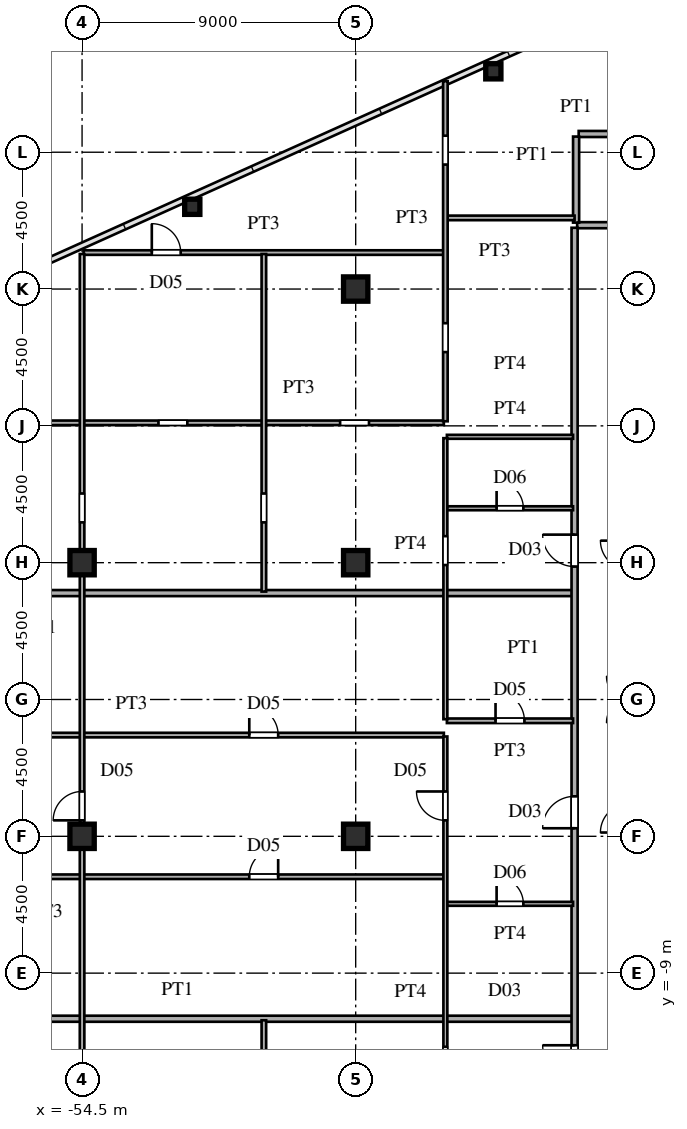
"""IFC4 building model, lengths in metres.
Left out: names, types, materials, properties, quantities, classifications, styles, units other than length and angle.
Written with IfcOpenShell. Run it as: python <this file> out.ifc"""

import sys

from ifc_helpers import new_model, si_unit, direction, frame, frame_2d, origin, origin_2d, place, context, subcontext, project, spatial, rectangle, hollow_rectangle, i_section, extrude, source, transform, mapped, element, fill, save


model = new_model("IFC4")
c1 = context("Model", 3, precision=1e-05, world=origin(), true_north=direction((0.0, 1.0)))
c2 = subcontext(c1, "Body", "Model", "MODEL_VIEW")
j1 = project(units=[si_unit("LENGTHUNIT", "METRE"), si_unit("PLANEANGLEUNIT", "RADIAN")], contexts=[c1])
p1 = place(None, origin())
s1 = spatial("IfcSite", under=j1, at=p1, CompositionType="ELEMENT")
p2 = place(p1, origin())
s2 = spatial("IfcBuilding", under=s1, at=p2, CompositionType="ELEMENT")
p3 = place(p2, frame((0.0, 0.0, 106.8)))
s3 = spatial("IfcBuildingStorey", under=s2, at=p3, CompositionType="ELEMENT", Elevation=106.8)
m1 = source(origin(), c2, "Body", "SweptSolid", [
    extrude(i_section(OverallWidth=0.8, OverallDepth=0.8, WebThickness=0.032, FlangeThickness=0.05, at=origin_2d()), origin(), (0.0, 0.0, 1.0), 3.6),
])
for number, where, z_axis, x_axis in (
    (1, (-45.5, -4.5, 0.0), (0.0, 0.0, 1.0), (1.0, 0.0, 0.0)),
    (2, (-45.5, 4.5, 0.0), (0.0, 0.0, 1.0), (1.0, 0.0, 0.0)),
    (3, (-45.5, 13.5, 0.0), (0.0, 0.0, 1.0), (1.0, 0.0, 0.0)),
    (4, (-54.5, -4.5, 0.0), (0.0, 0.0, 1.0), (1.0, 0.0, 0.0)),
    (5, (-54.5, 4.5, 0.0), (0.0, 0.0, 1.0), (1.0, 0.0, 0.0)),
):
    element("IfcColumn", number, at=place(p3, frame(where, z_axis=z_axis, x_axis=x_axis)), inside=s3, PredefinedType="COLUMN", context=c2, shape_type="MappedRepresentation", body=[
        mapped(m1, transform((0.0, 0.0, 0.0), scale=1.0)),
    ])
m2 = source(origin(), c2, "Body", "SweptSolid", [
    extrude(hollow_rectangle(XDim=0.5, YDim=0.5, WallThickness=0.02, at=origin_2d()), origin(), (0.0, 0.0, 1.0), 3.6),
])
for number, where, z_axis, x_axis in (
    (6, (-40.973, 20.661, 0.0), (0.0, 0.0, 1.0), (1.0, 0.0, 0.0)),
    (7, (-50.875, 16.205, 0.0), (0.0, 0.0, 1.0), (1.0, 0.0, 0.0)),
):
    element("IfcColumn", number, at=place(p3, frame(where, z_axis=z_axis, x_axis=x_axis)), inside=s3, PredefinedType="COLUMN", context=c2, shape_type="MappedRepresentation", body=[
        mapped(m2, transform((0.0, 0.0, 0.0), scale=1.0)),
    ])
p4 = place(p3, frame((-64.346, -10.5, 0.0), z_axis=(0.0, 0.0, 1.0), x_axis=(1.0, 0.0, 0.0)))
e8 = element("IfcWall", 8, at=p4, inside=s3, PredefinedType="PARTITIONING", context=c2, shape_type="SweptSolid", body=[
    extrude(rectangle(XDim=25.966, YDim=0.2, at=frame_2d((12.983, 0.0))), origin(), (0.0, 0.0, 1.0), 3.38),
])
p5 = place(p3, frame((-42.5, -6.72, 0.0), z_axis=(0.0, 0.0, 1.0), x_axis=(1.0, 0.0, 0.0)))
e9 = element("IfcWall", 9, at=p5, inside=s3, PredefinedType="PARTITIONING", context=c2, shape_type="SweptSolid", body=[
    extrude(rectangle(XDim=4.15, YDim=0.13, at=frame_2d((2.075, 0.0))), origin(), (0.0, 0.0, 1.0), 3.38),
])
p6 = place(p5, frame((1.635, 0.0, 0.0)))
e10 = element("IfcOpeningElement", 10, at=p6, cuts=e9, PredefinedType="OPENING", context=c2, shape_type="SweptSolid", body=[
    extrude(rectangle(XDim=0.88, YDim=2.1, at=frame_2d((0.44, 1.05))), frame((0.0, 0.075, 0.0), z_axis=(0.0, -1.0, 0.0), x_axis=(1.0, 0.0, 0.0)), (0.0, 0.0, 1.0), 0.15),
])
p7 = place(p3, frame((-71.035, -5.83, 0.0), z_axis=(0.0, 0.0, 1.0), x_axis=(1.0, 0.0, 0.0)))
e11 = element("IfcWall", 11, at=p7, inside=s3, PredefinedType="PARTITIONING", context=c2, shape_type="SweptSolid", body=[
    extrude(rectangle(XDim=28.435, YDim=0.15, at=frame_2d((14.217, 0.0))), origin(), (0.0, 0.0, 1.0), 3.38),
])
p8 = place(p7, frame((22.035, 0.0, 0.0)))
e12 = element("IfcOpeningElement", 12, at=p8, cuts=e11, PredefinedType="OPENING", context=c2, shape_type="SweptSolid", body=[
    extrude(rectangle(XDim=0.95, YDim=2.15, at=frame_2d((0.475, 1.075))), frame((0.0, 0.085, 0.0), z_axis=(0.0, -1.0, 0.0), x_axis=(1.0, 0.0, 0.0)), (0.0, 0.0, 1.0), 0.17),
])
p9 = place(p7, frame((13.21, 0.0, 0.0)))
e13 = element("IfcOpeningElement", 13, at=p9, cuts=e11, PredefinedType="OPENING", context=c2, shape_type="SweptSolid", body=[
    extrude(rectangle(XDim=0.95, YDim=2.15, at=frame_2d((0.475, 1.075))), frame((0.0, 0.085, 0.0), z_axis=(0.0, -1.0, 0.0), x_axis=(1.0, 0.0, 0.0)), (0.0, 0.0, 1.0), 0.17),
])
p10 = place(p3, frame((-71.035, -1.17, 0.0), z_axis=(0.0, 0.0, 1.0), x_axis=(1.0, 0.0, 0.0)))
e14 = element("IfcWall", 14, at=p10, inside=s3, PredefinedType="PARTITIONING", context=c2, shape_type="SweptSolid", body=[
    extrude(rectangle(XDim=28.435, YDim=0.15, at=frame_2d((14.217, 0.0))), origin(), (0.0, 0.0, 1.0), 3.38),
])
p11 = place(p10, frame((22.035, 0.0, 0.0)))
e15 = element("IfcOpeningElement", 15, at=p11, cuts=e14, PredefinedType="OPENING", context=c2, shape_type="SweptSolid", body=[
    extrude(rectangle(XDim=0.95, YDim=2.15, at=frame_2d((0.475, 1.075))), frame((0.0, 0.085, 0.0), z_axis=(0.0, -1.0, 0.0), x_axis=(1.0, 0.0, 0.0)), (0.0, 0.0, 1.0), 0.17),
])
p12 = place(p10, frame((13.21, 0.0, 0.0)))
e16 = element("IfcOpeningElement", 16, at=p12, cuts=e14, PredefinedType="OPENING", context=c2, shape_type="SweptSolid", body=[
    extrude(rectangle(XDim=0.95, YDim=2.15, at=frame_2d((0.475, 1.075))), frame((0.0, 0.085, 0.0), z_axis=(0.0, -1.0, 0.0), x_axis=(1.0, 0.0, 0.0)), (0.0, 0.0, 1.0), 0.17),
])
p13 = place(p3, frame((-42.5, -0.7, 0.0), z_axis=(0.0, 0.0, 1.0), x_axis=(1.0, 0.0, 0.0)))
e17 = element("IfcWall", 17, at=p13, inside=s3, PredefinedType="PARTITIONING", context=c2, shape_type="SweptSolid", body=[
    extrude(rectangle(XDim=4.15, YDim=0.15, at=frame_2d((2.075, 0.0))), origin(), (0.0, 0.0, 1.0), 3.38),
])
p14 = place(p13, frame((1.6, 0.0, 0.0)))
e18 = element("IfcOpeningElement", 18, at=p14, cuts=e17, PredefinedType="OPENING", context=c2, shape_type="SweptSolid", body=[
    extrude(rectangle(XDim=0.95, YDim=2.15, at=frame_2d((0.475, 1.075))), frame((0.0, 0.085, 0.0), z_axis=(0.0, -1.0, 0.0), x_axis=(1.0, 0.0, 0.0)), (0.0, 0.0, 1.0), 0.17),
])
p15 = place(p3, frame((-71.005, 3.5, 0.0), z_axis=(0.0, 0.0, 1.0), x_axis=(1.0, 0.0, 0.0)))
e19 = element("IfcWall", 19, at=p15, inside=s3, PredefinedType="PARTITIONING", context=c2, shape_type="SweptSolid", body=[
    extrude(rectangle(XDim=32.625, YDim=0.2, at=frame_2d((16.312, 0.0))), origin(), (0.0, 0.0, 1.0), 3.38),
])
p16 = place(p3, frame((-42.5, 6.29, 0.0), z_axis=(0.0, 0.0, 1.0), x_axis=(1.0, 0.0, 0.0)))
e20 = element("IfcWall", 20, at=p16, inside=s3, PredefinedType="PARTITIONING", context=c2, shape_type="SweptSolid", body=[
    extrude(rectangle(XDim=4.15, YDim=0.13, at=frame_2d((2.075, 0.0))), origin(), (0.0, 0.0, 1.0), 3.38),
])
p17 = place(p16, frame((1.635, 0.0, 0.0)))
e21 = element("IfcOpeningElement", 21, at=p17, cuts=e20, PredefinedType="OPENING", context=c2, shape_type="SweptSolid", body=[
    extrude(rectangle(XDim=0.88, YDim=2.1, at=frame_2d((0.44, 1.05))), frame((0.0, 0.075, 0.0), z_axis=(0.0, -1.0, 0.0), x_axis=(1.0, 0.0, 0.0)), (0.0, 0.0, 1.0), 0.15),
])
p18 = place(p3, frame((-42.5, 8.64, 0.0), z_axis=(0.0, 0.0, 1.0), x_axis=(1.0, 0.0, 0.0)))
e22 = element("IfcWall", 22, at=p18, inside=s3, PredefinedType="PARTITIONING", context=c2, shape_type="SweptSolid", body=[
    extrude(rectangle(XDim=4.15, YDim=0.13, at=frame_2d((2.075, 0.0))), origin(), (0.0, 0.0, 1.0), 3.38),
])
p19 = place(p3, frame((-67.478, 9.1, 0.0), z_axis=(0.0, 0.0, 1.0), x_axis=(1.0, 0.0, 0.0)))
e23 = element("IfcWall", 23, at=p19, inside=s3, PredefinedType="PARTITIONING", context=c2, shape_type="SweptSolid", body=[
    extrude(rectangle(XDim=24.878, YDim=0.15, at=frame_2d((12.439, 0.0))), origin(), (0.0, 0.0, 1.0), 3.38),
])
p20 = place(p19, frame((21.466, 0.0, 0.0)))
e24 = element("IfcOpeningElement", 24, at=p20, cuts=e23, PredefinedType="OPENING", context=c2, shape_type="SweptSolid", body=[
    extrude(rectangle(XDim=0.95, YDim=2.15, at=frame_2d((0.475, 1.075))), frame((0.0, 0.085, 0.0), z_axis=(0.0, -1.0, 0.0), x_axis=(1.0, 0.0, 0.0)), (0.0, 0.0, 1.0), 0.17),
])
p21 = place(p19, frame((9.653, 0.0, 0.0)))
e25 = element("IfcOpeningElement", 25, at=p21, cuts=e23, PredefinedType="OPENING", context=c2, shape_type="SweptSolid", body=[
    extrude(rectangle(XDim=0.95, YDim=2.15, at=frame_2d((0.475, 1.075))), frame((0.0, 0.085, 0.0), z_axis=(0.0, -1.0, 0.0), x_axis=(1.0, 0.0, 0.0)), (0.0, 0.0, 1.0), 0.17),
])
p22 = place(p19, frame((15.49, 0.0, 0.0)))
e26 = element("IfcOpeningElement", 26, at=p22, cuts=e23, PredefinedType="OPENING", context=c2, shape_type="SweptSolid", body=[
    extrude(rectangle(XDim=0.95, YDim=2.15, at=frame_2d((0.475, 1.075))), frame((0.0, 0.085, 0.0), z_axis=(0.0, -1.0, 0.0), x_axis=(1.0, 0.0, 0.0)), (0.0, 0.0, 1.0), 0.17),
])
p23 = place(p3, frame((-54.45, 14.7, 0.0), z_axis=(0.0, 0.0, 1.0), x_axis=(1.0, 0.0, 0.0)))
e27 = element("IfcWall", 27, at=p23, inside=s3, PredefinedType="PARTITIONING", context=c2, shape_type="SweptSolid", body=[
    extrude(rectangle(XDim=11.85, YDim=0.15, at=frame_2d((5.925, 0.0))), origin(), (0.0, 0.0, 1.0), 3.38),
])
p24 = place(p23, frame((2.244, 0.0, 0.0)))
e28 = element("IfcOpeningElement", 28, at=p24, cuts=e27, PredefinedType="OPENING", context=c2, shape_type="SweptSolid", body=[
    extrude(rectangle(XDim=0.95, YDim=2.15, at=frame_2d((0.475, 1.075))), frame((0.0, 0.085, 0.0), z_axis=(0.0, -1.0, 0.0), x_axis=(1.0, 0.0, 0.0)), (0.0, 0.0, 1.0), 0.17),
])
p25 = place(p3, frame((-38.215, 15.6, 0.0), z_axis=(0.0, 0.0, 1.0), x_axis=(1.0, 0.0, 0.0)))
e29 = element("IfcWall", 29, at=p25, inside=s3, PredefinedType="PARTITIONING", context=c2, shape_type="SweptSolid", body=[
    extrude(rectangle(XDim=1.63, YDim=0.2, at=frame_2d((0.815, 0.0))), origin(), (0.0, 0.0, 1.0), 3.38),
])
p26 = place(p3, frame((-42.5, 15.84, 0.0), z_axis=(0.0, 0.0, 1.0), x_axis=(1.0, 0.0, 0.0)))
e30 = element("IfcWall", 30, at=p26, inside=s3, PredefinedType="PARTITIONING", context=c2, shape_type="SweptSolid", body=[
    extrude(rectangle(XDim=4.2, YDim=0.15, at=frame_2d((2.1, 0.0))), origin(), (0.0, 0.0, 1.0), 3.38),
])
p27 = place(p3, frame((-38.165, 18.6, 0.0), z_axis=(0.0, 0.0, 1.0), x_axis=(1.0, 0.0, 0.0)))
e31 = element("IfcWall", 31, at=p27, inside=s3, PredefinedType="PARTITIONING", context=c2, shape_type="SweptSolid", body=[
    extrude(rectangle(XDim=0.753, YDim=0.2, at=frame_2d((0.376, 0.0))), origin(), (0.0, 0.0, 1.0), 2.08),
])
p28 = place(p3, frame((-37.412, 18.6, 0.0), z_axis=(0.0, 0.0, 1.0), x_axis=(1.0, 0.0, 0.0)))
e32 = element("IfcWall", 32, at=p28, inside=s3, PredefinedType="PARTITIONING", context=c2, shape_type="SweptSolid", body=[
    extrude(rectangle(XDim=1.577, YDim=0.2, at=frame_2d((0.789, 0.0))), origin(), (0.0, 0.0, 1.0), 3.38),
])
p29 = place(p3, frame((-54.5, -14.96, 0.0), z_axis=(0.0, 0.0, 1.0), x_axis=(0.0, 1.0, 0.0)))
e33 = element("IfcWall", 33, at=p29, inside=s3, PredefinedType="PARTITIONING", context=c2, shape_type="SweptSolid", body=[
    extrude(rectangle(XDim=29.612, YDim=0.15, at=frame_2d((14.806, 0.0))), origin(), (0.0, 0.0, 1.0), 2.78),
])
p30 = place(p29, frame((1.772, 0.0, 0.0)))
e34 = element("IfcOpeningElement", 34, at=p30, cuts=e33, PredefinedType="OPENING", context=c2, shape_type="SweptSolid", body=[
    extrude(rectangle(XDim=0.95, YDim=2.15, at=frame_2d((0.475, 1.075))), frame((0.0, 0.085, 0.0), z_axis=(0.0, -1.0, 0.0), x_axis=(1.0, 0.0, 0.0)), (0.0, 0.0, 1.0), 0.17),
])
p31 = place(p29, frame((10.985, 0.0, 0.0)))
e35 = element("IfcOpeningElement", 35, at=p31, cuts=e33, PredefinedType="OPENING", context=c2, shape_type="SweptSolid", body=[
    extrude(rectangle(XDim=0.95, YDim=2.15, at=frame_2d((0.475, 1.075))), frame((0.0, 0.085, 0.0), z_axis=(0.0, -1.0, 0.0), x_axis=(1.0, 0.0, 0.0)), (0.0, 0.0, 1.0), 0.17),
])
p32 = place(p29, frame((20.785, 0.0, 0.0)))
e36 = element("IfcOpeningElement", 36, at=p32, cuts=e33, PredefinedType="OPENING", context=c2, shape_type="SweptSolid", body=[
    extrude(rectangle(XDim=0.95, YDim=2.15, at=frame_2d((0.475, 1.075))), frame((0.0, 0.085, 0.0), z_axis=(0.0, -1.0, 0.0), x_axis=(1.0, 0.0, 0.0)), (0.0, 0.0, 1.0), 0.17),
])
p33 = place(p3, frame((-48.52, -15.351, 0.0), z_axis=(0.0, 0.0, 1.0), x_axis=(0.0, 1.0, 0.0)))
e37 = element("IfcWall", 37, at=p33, inside=s3, PredefinedType="PARTITIONING", context=c2, shape_type="SweptSolid", body=[
    extrude(rectangle(XDim=4.801, YDim=0.15, at=frame_2d((2.4, 0.0))), origin(), (0.0, 0.0, 1.0), 3.38),
])
p34 = place(p33, frame((1.925, 0.0, 0.0)))
e38 = element("IfcOpeningElement", 38, at=p34, cuts=e37, PredefinedType="OPENING", context=c2, shape_type="SweptSolid", body=[
    extrude(rectangle(XDim=0.95, YDim=2.15, at=frame_2d((0.475, 1.075))), frame((0.0, 0.085, 0.0), z_axis=(0.0, -1.0, 0.0), x_axis=(1.0, 0.0, 0.0)), (0.0, 0.0, 1.0), 0.17),
])
p35 = place(p3, frame((-48.52, 3.55, 0.0), z_axis=(0.0, 0.0, 1.0), x_axis=(0.0, 1.0, 0.0)))
e39 = element("IfcWall", 39, at=p35, inside=s3, PredefinedType="PARTITIONING", context=c2, shape_type="SweptSolid", body=[
    extrude(rectangle(XDim=11.102, YDim=0.15, at=frame_2d((5.551, 0.0))), origin(), (0.0, 0.0, 1.0), 3.38),
])
p36 = place(p35, frame((2.275, 0.0, 0.0)))
e40 = element("IfcOpeningElement", 40, at=p36, cuts=e39, PredefinedType="OPENING", context=c2, shape_type="SweptSolid", body=[
    extrude(rectangle(XDim=0.95, YDim=2.15, at=frame_2d((0.475, 1.075))), frame((0.0, 0.085, 0.0), z_axis=(0.0, -1.0, 0.0), x_axis=(1.0, 0.0, 0.0)), (0.0, 0.0, 1.0), 0.17),
])
p37 = place(p3, frame((-42.55, -20.337, 0.0), z_axis=(0.0, 0.0, 1.0), x_axis=(0.0, 1.0, 0.0)))
e41 = element("IfcWall", 41, at=p37, inside=s3, PredefinedType="PARTITIONING", context=c2, shape_type="SweptSolid", body=[
    extrude(rectangle(XDim=19.12, YDim=0.13, at=frame_2d((9.56, 0.0))), origin(), (0.0, 0.0, 1.0), 3.38),
])
p38 = place(p37, frame((7.965, 0.0, 0.0)))
e42 = element("IfcOpeningElement", 42, at=p38, cuts=e41, PredefinedType="OPENING", context=c2, shape_type="SweptSolid", body=[
    extrude(rectangle(XDim=0.95, YDim=2.15, at=frame_2d((0.475, 1.075))), frame((0.0, 0.075, 0.0), z_axis=(0.0, -1.0, 0.0), x_axis=(1.0, 0.0, 0.0)), (0.0, 0.0, 1.0), 0.15),
])
p39 = place(p37, frame((1.161, 0.0, 0.0)))
e43 = element("IfcOpeningElement", 43, at=p39, cuts=e41, PredefinedType="OPENING", context=c2, shape_type="SweptSolid", body=[
    extrude(rectangle(XDim=0.95, YDim=2.15, at=frame_2d((0.475, 1.075))), frame((0.0, 0.075, 0.0), z_axis=(0.0, -1.0, 0.0), x_axis=(1.0, 0.0, 0.0)), (0.0, 0.0, 1.0), 0.15),
])
p40 = place(p37, frame((16.362, 0.0, 0.0)))
e44 = element("IfcOpeningElement", 44, at=p40, cuts=e41, PredefinedType="OPENING", context=c2, shape_type="SweptSolid", body=[
    extrude(rectangle(XDim=0.95, YDim=2.15, at=frame_2d((0.475, 1.075))), frame((0.0, 0.075, 0.0), z_axis=(0.0, -1.0, 0.0), x_axis=(1.0, 0.0, 0.0)), (0.0, 0.0, 1.0), 0.15),
])
p41 = place(p3, frame((-42.55, -0.648, 0.0), z_axis=(0.0, 0.0, 1.0), x_axis=(0.0, 1.0, 0.0)))
e45 = element("IfcWall", 45, at=p41, inside=s3, PredefinedType="PARTITIONING", context=c2, shape_type="SweptSolid", body=[
    extrude(rectangle(XDim=9.243, YDim=0.13, at=frame_2d((4.622, 0.0))), origin(), (0.0, 0.0, 1.0), 3.38),
])
p42 = place(p41, frame((5.071, 0.0, 0.0)))
e46 = element("IfcOpeningElement", 46, at=p42, cuts=e45, PredefinedType="OPENING", context=c2, shape_type="SweptSolid", body=[
    extrude(rectangle(XDim=0.95, YDim=2.15, at=frame_2d((0.475, 1.075))), frame((0.0, 0.075, 0.0), z_axis=(0.0, -1.0, 0.0), x_axis=(1.0, 0.0, 0.0)), (0.0, 0.0, 1.0), 0.15),
])
p43 = place(p3, frame((-42.55, 9.151, 0.0), z_axis=(0.0, 0.0, 1.0), x_axis=(0.0, 1.0, 0.0)))
e47 = element("IfcWall", 47, at=p43, inside=s3, PredefinedType="PARTITIONING", context=c2, shape_type="SweptSolid", body=[
    extrude(rectangle(XDim=11.186, YDim=0.15, at=frame_2d((5.593, 0.0))), origin(), (0.0, 0.0, 1.0), 3.38),
])
p44 = place(p43, frame((2.275, 0.0, 0.0)))
e48 = element("IfcOpeningElement", 48, at=p44, cuts=e47, PredefinedType="OPENING", context=c2, shape_type="SweptSolid", body=[
    extrude(rectangle(XDim=0.95, YDim=2.15, at=frame_2d((0.475, 1.075))), frame((0.0, 0.085, 0.0), z_axis=(0.0, -1.0, 0.0), x_axis=(1.0, 0.0, 0.0)), (0.0, 0.0, 1.0), 0.17),
])
p45 = place(p43, frame((8.443, 0.0, 0.0)))
e49 = element("IfcOpeningElement", 49, at=p45, cuts=e47, PredefinedType="OPENING", context=c2, shape_type="SweptSolid", body=[
    extrude(rectangle(XDim=0.95, YDim=2.15, at=frame_2d((0.475, 1.075))), frame((0.0, 0.085, 0.0), z_axis=(0.0, -1.0, 0.0), x_axis=(1.0, 0.0, 0.0)), (0.0, 0.0, 1.0), 0.17),
])
p46 = place(p3, frame((-38.3, -15.515, 0.0), z_axis=(0.0, 0.0, 1.0), x_axis=(0.0, 1.0, 0.0)))
e50 = element("IfcWall", 50, at=p46, inside=s3, PredefinedType="PARTITIONING", context=c2, shape_type="SweptSolid", body=[
    extrude(rectangle(XDim=31.03, YDim=0.2, at=frame_2d((15.515, 0.0))), origin(), (0.0, 0.0, 1.0), 3.38),
])
p47 = place(p46, frame((3.093, 0.0, 0.0)))
e51 = element("IfcOpeningElement", 51, at=p47, cuts=e50, PredefinedType="OPENING", context=c2, shape_type="SweptSolid", body=[
    extrude(rectangle(XDim=1.05, YDim=2.25, at=frame_2d((0.525, 1.125))), frame((0.0, 0.11, 0.0), z_axis=(0.0, -1.0, 0.0), x_axis=(1.0, 0.0, 0.0)), (0.0, 0.0, 1.0), 0.22),
])
p48 = place(p46, frame((11.28, 0.0, 0.0)))
e52 = element("IfcOpeningElement", 52, at=p48, cuts=e50, PredefinedType="OPENING", context=c2, shape_type="SweptSolid", body=[
    extrude(rectangle(XDim=1.05, YDim=2.25, at=frame_2d((0.525, 1.125))), frame((0.0, 0.11, 0.0), z_axis=(0.0, -1.0, 0.0), x_axis=(1.0, 0.0, 0.0)), (0.0, 0.0, 1.0), 0.22),
])
p49 = place(p46, frame((19.887, 0.0, 0.0)))
e53 = element("IfcOpeningElement", 53, at=p49, cuts=e50, PredefinedType="OPENING", context=c2, shape_type="SweptSolid", body=[
    extrude(rectangle(XDim=1.05, YDim=2.25, at=frame_2d((0.525, 1.125))), frame((0.0, 0.11, 0.0), z_axis=(0.0, -1.0, 0.0), x_axis=(1.0, 0.0, 0.0)), (0.0, 0.0, 1.0), 0.22),
])
p50 = place(p3, frame((-38.25, 15.685, 0.0), z_axis=(0.0, 0.0, 1.0), x_axis=(0.0, 1.0, 0.0)))
e54 = element("IfcWall", 54, at=p50, inside=s3, PredefinedType="PARTITIONING", context=c2, shape_type="SweptSolid", body=[
    extrude(rectangle(XDim=2.83, YDim=0.2, at=frame_2d((1.415, 0.0))), origin(), (0.0, 0.0, 1.0), 3.38),
])
m3 = source(origin(), c2, "Body", "SweptSolid", [
    extrude(rectangle(XDim=0.88, YDim=2.1, at=frame_2d((0.44, 1.05))), frame((0.0, 0.025, 0.0), z_axis=(0.0, -1.0, 0.0), x_axis=(1.0, 0.0, 0.0)), (0.0, 0.0, 1.0), 0.05),
])
p51 = place(p6, origin())
e55 = element("IfcDoor", 55, at=p51, inside=s3, OperationType="SINGLE_SWING_LEFT", PredefinedType="DOOR", context=c2, shape_type="MappedRepresentation", body=[
    mapped(m3, transform((0.0, 0.0, 0.0), scale=1.0)),
])
fill(e10, e55)
m4 = source(origin(), c2, "Body", "SweptSolid", [
    extrude(rectangle(XDim=0.95, YDim=2.15, at=frame_2d((0.475, 1.075))), frame((0.0, 0.025, 0.0), z_axis=(0.0, -1.0, 0.0), x_axis=(1.0, 0.0, 0.0)), (0.0, 0.0, 1.0), 0.05),
])
p52 = place(p8, origin())
e56 = element("IfcDoor", 56, at=p52, inside=s3, OperationType="SINGLE_SWING_RIGHT", PredefinedType="DOOR", context=c2, shape_type="MappedRepresentation", body=[
    mapped(m4, transform((0.0, 0.0, 0.0), scale=1.0)),
])
fill(e12, e56)
p53 = place(p11, origin())
e57 = element("IfcDoor", 57, at=p53, inside=s3, OperationType="SINGLE_SWING_LEFT", PredefinedType="DOOR", context=c2, shape_type="MappedRepresentation", body=[
    mapped(m4, transform((0.0, 0.0, 0.0), scale=1.0)),
])
fill(e15, e57)
p54 = place(p14, origin())
e58 = element("IfcDoor", 58, at=p54, inside=s3, OperationType="SINGLE_SWING_LEFT", PredefinedType="DOOR", context=c2, shape_type="MappedRepresentation", body=[
    mapped(m4, transform((0.0, 0.0, 0.0), scale=1.0)),
])
fill(e18, e58)
p55 = place(p17, origin())
e59 = element("IfcDoor", 59, at=p55, inside=s3, OperationType="SINGLE_SWING_LEFT", PredefinedType="DOOR", context=c2, shape_type="MappedRepresentation", body=[
    mapped(m3, transform((0.0, 0.0, 0.0), scale=1.0)),
])
fill(e21, e59)
p56 = place(p24, origin())
e60 = element("IfcDoor", 60, at=p56, inside=s3, OperationType="SINGLE_SWING_LEFT", PredefinedType="DOOR", context=c2, shape_type="MappedRepresentation", body=[
    mapped(m4, transform((0.0, 0.0, 0.0), scale=1.0)),
])
fill(e28, e60)
p57 = place(p31, origin())
e61 = element("IfcDoor", 61, at=p57, inside=s3, OperationType="SINGLE_SWING_LEFT", PredefinedType="DOOR", context=c2, shape_type="MappedRepresentation", body=[
    mapped(m4, transform((0.0, 0.0, 0.0), scale=1.0)),
])
fill(e35, e61)
p58 = place(p40, origin())
e62 = element("IfcDoor", 62, at=p58, inside=s3, OperationType="SINGLE_SWING_RIGHT", PredefinedType="DOOR", context=c2, shape_type="MappedRepresentation", body=[
    mapped(m4, transform((0.0, 0.0, 0.0), scale=1.0)),
])
fill(e44, e62)
m5 = source(origin(), c2, "Body", "SweptSolid", [
    extrude(rectangle(XDim=1.05, YDim=2.25, at=frame_2d((0.525, 1.125))), frame((0.0, 0.025, 0.0), z_axis=(0.0, -1.0, 0.0), x_axis=(1.0, 0.0, 0.0)), (0.0, 0.0, 1.0), 0.05),
])
p59 = place(p47, origin())
e63 = element("IfcDoor", 63, at=p59, inside=s3, OperationType="SINGLE_SWING_RIGHT", PredefinedType="DOOR", context=c2, shape_type="MappedRepresentation", body=[
    mapped(m5, transform((0.0, 0.0, 0.0), scale=1.0)),
])
fill(e51, e63)
p60 = place(p48, origin())
e64 = element("IfcDoor", 64, at=p60, inside=s3, OperationType="SINGLE_SWING_LEFT", PredefinedType="DOOR", context=c2, shape_type="MappedRepresentation", body=[
    mapped(m5, transform((0.0, 0.0, 0.0), scale=1.0)),
])
fill(e52, e64)
p61 = place(p49, origin())
e65 = element("IfcDoor", 65, at=p61, inside=s3, OperationType="SINGLE_SWING_RIGHT", PredefinedType="DOOR", context=c2, shape_type="MappedRepresentation", body=[
    mapped(m5, transform((0.0, 0.0, 0.0), scale=1.0)),
])
fill(e53, e65)
save(model, sys.argv[1])
